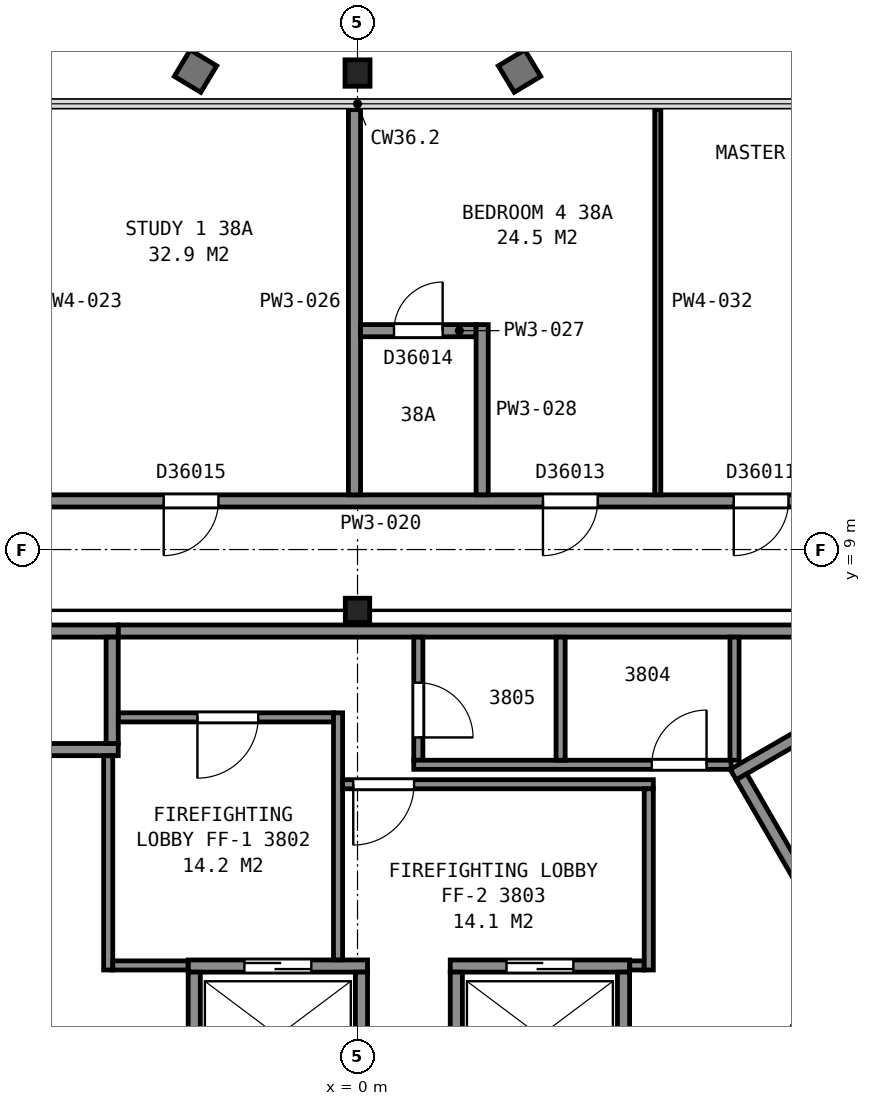
"""IFC4 building model, lengths in metres.
Left out: names, types, materials, properties, quantities, classifications, styles, units other than length and angle.
Written with IfcOpenShell. Run it as: python <this file> out.ifc"""

import sys

from ifc_helpers import new_model, si_unit, direction, frame, frame_2d, origin, origin_2d, place, context, subcontext, project, spatial, rectangle, i_section, extrude, element, fill, save


model = new_model("IFC4")
c1 = context("Model", 3, precision=1e-05, world=origin(), true_north=direction((0.0, 1.0)))
c2 = subcontext(c1, "Body", "Model", "MODEL_VIEW")
j1 = project(units=[si_unit("LENGTHUNIT", "METRE"), si_unit("PLANEANGLEUNIT", "RADIAN")], contexts=[c1])
p1 = place(None, origin())
s1 = spatial("IfcSite", under=j1, at=p1, CompositionType="ELEMENT")
p2 = place(p1, origin())
s2 = spatial("IfcBuilding", under=s1, at=p2, CompositionType="ELEMENT")
p3 = place(p2, frame((0.0, 0.0, 156.2)))
s3 = spatial("IfcBuildingStorey", under=s2, at=p3, CompositionType="ELEMENT", Elevation=156.2)
p4 = place(p3, frame((0.0, 16.617, 0.035), z_axis=(0.0, 0.185900290054, 0.982568614478), x_axis=(1.0, 0.0, 0.0)))
e1 = element("IfcColumn", 1, at=p4, inside=s3, PredefinedType="COLUMN", context=c2, shape_type="SweptSolid", body=[
    extrude(i_section(OverallWidth=0.411, OverallDepth=0.434, WebThickness=0.036, FlangeThickness=0.057, FilletRadius=0.015, at=origin_2d()), origin(), (0.0, 0.0, 1.0), 3.694),
])
p5 = place(p3, frame((0.0, 8.0, 0.0), z_axis=(0.0, 0.0, 1.0), x_axis=(1.0, 0.0, 0.0)))
e2 = element("IfcColumn", 2, at=p5, inside=s3, PredefinedType="COLUMN", context=c2, shape_type="SweptSolid", body=[
    extrude(i_section(OverallWidth=0.401, OverallDepth=0.399, WebThickness=0.025, FlangeThickness=0.04, FilletRadius=0.015, at=origin_2d()), origin(), (0.0, 0.0, 1.0), 3.7),
])
p6 = place(p3, frame((6.178, 5.299, 0.0), z_axis=(0.0, 0.0, 1.0), x_axis=(0.866019993635, 0.500009370536, 0.0)))
e3 = element("IfcWall", 3, at=p6, inside=s3, PredefinedType="PARTITIONING", context=c2, shape_type="SweptSolid", body=[
    extrude(rectangle(XDim=9.6, YDim=0.2, at=frame_2d((4.8, 0.0))), origin(), (0.0, 0.0, 1.0), 3.45),
])
p7 = place(p3, frame((7.715, 2.838, 0.0), z_axis=(0.0, 0.0, 1.0), x_axis=(-0.500049511043, 0.865996816683, 0.0)))
e4 = element("IfcWall", 4, at=p7, inside=s3, PredefinedType="PARTITIONING", context=c2, shape_type="SweptSolid", body=[
    extrude(rectangle(XDim=2.8, YDim=0.2, at=frame_2d((1.4, 0.0))), origin(), (0.0, 0.0, 1.0), 3.45),
])
p8 = place(p3, frame((-2.785, 2.15, 0.0), z_axis=(0.0, 0.0, 1.0), x_axis=(1.0, 0.0, 0.0)))
e5 = element("IfcWall", 5, at=p8, inside=s3, PredefinedType="PARTITIONING", context=c2, shape_type="SweptSolid", body=[
    extrude(rectangle(XDim=2.95, YDim=0.2, at=frame_2d((1.475, 0.0))), origin(), (0.0, 0.0, 1.0), 3.7),
])
p9 = place(p8, frame((0.925, 0.0, 0.0)))
e6 = element("IfcOpeningElement", 6, at=p9, cuts=e5, PredefinedType="OPENING", context=c2, shape_type="SweptSolid", body=[
    extrude(rectangle(XDim=1.1, YDim=2.1, at=frame_2d((0.55, 1.05))), frame((0.0, 0.11, 0.0), z_axis=(0.0, -1.0, 0.0), x_axis=(1.0, 0.0, 0.0)), (0.0, 0.0, 1.0), 0.22),
])
p10 = place(p3, frame((1.525, 2.15, 0.0), z_axis=(0.0, 0.0, 1.0), x_axis=(1.0, 0.0, 0.0)))
e7 = element("IfcWall", 7, at=p10, inside=s3, PredefinedType="PARTITIONING", context=c2, shape_type="SweptSolid", body=[
    extrude(rectangle(XDim=2.95, YDim=0.2, at=frame_2d((1.475, 0.0))), origin(), (0.0, 0.0, 1.0), 3.7),
])
p11 = place(p10, frame((0.925, 0.0, 0.0)))
e8 = element("IfcOpeningElement", 8, at=p11, cuts=e7, PredefinedType="OPENING", context=c2, shape_type="SweptSolid", body=[
    extrude(rectangle(XDim=1.1, YDim=2.1, at=frame_2d((0.55, 1.05))), frame((0.0, 0.11, 0.0), z_axis=(0.0, -1.0, 0.0), x_axis=(1.0, 0.0, 0.0)), (0.0, 0.0, 1.0), 0.22),
])
for number, where, z_axis, x_axis in (
    (9, (-6.285, 5.71, 0.0), (0.0, 0.0, 1.0), (1.0, 0.0, 0.0)),
    (10, (-6.285, 7.66, 0.0), (0.0, 0.0, 1.0), (1.0, 0.0, 0.0)),
):
    element("IfcWall", number, at=place(p3, frame(where, z_axis=z_axis, x_axis=x_axis)), inside=s3, PredefinedType="PARTITIONING", context=c2, shape_type="SweptSolid", body=[
        extrude(rectangle(XDim=2.35, YDim=0.2, at=frame_2d((1.175, 0.0))), origin(), (0.0, 0.0, 1.0), 3.7),
    ])
p12 = place(p3, frame((5.663, -1.612, 0.0), z_axis=(0.0, 0.0, 1.0), x_axis=(0.49998122708, 0.866036242063, 0.0)))
e11 = element("IfcWall", 11, at=p12, inside=s3, PredefinedType="PARTITIONING", context=c2, shape_type="SweptSolid", body=[
    extrude(rectangle(XDim=4.9, YDim=0.2, at=frame_2d((2.45, 0.0))), origin(), (0.0, 0.0, 1.0), 3.7),
])
for number, where, z_axis, x_axis in (
    (12, (4.375, 0.1, 0.0), (0.0, 0.0, 1.0), (0.0, 1.0, 0.0)),
    (13, (1.625, 0.1, 0.0), (0.0, 0.0, 1.0), (0.0, 1.0, 0.0)),
    (14, (0.065, 0.1, 0.0), (0.0, 0.0, 1.0), (0.0, 1.0, 0.0)),
    (15, (-2.685, 0.1, 0.0), (0.0, 0.0, 1.0), (0.0, 1.0, 0.0)),
):
    element("IfcWall", number, at=place(p3, frame(where, z_axis=z_axis, x_axis=x_axis)), inside=s3, PredefinedType="PARTITIONING", context=c2, shape_type="SweptSolid", body=[
        extrude(rectangle(XDim=1.95, YDim=0.2, at=frame_2d((0.975, 0.0))), origin(), (0.0, 0.0, 1.0), 3.7),
    ])
p13 = place(p3, frame((-4.035, 5.81, 0.0), z_axis=(0.0, 0.0, 1.0), x_axis=(0.0, 1.0, 0.0)))
e16 = element("IfcWall", 16, at=p13, inside=s3, PredefinedType="PARTITIONING", context=c2, shape_type="SweptSolid", body=[
    extrude(rectangle(XDim=1.75, YDim=0.2, at=frame_2d((0.875, 0.0))), origin(), (0.0, 0.0, 1.0), 3.7),
])
p14 = place(p3, frame((-4.1, 2.085, 0.0), z_axis=(0.0, 0.0, 1.0), x_axis=(0.0, 1.0, 0.0)))
e17 = element("IfcWall", 17, at=p14, inside=s3, PredefinedType="PARTITIONING", context=c2, shape_type="SweptSolid", body=[
    extrude(rectangle(XDim=3.523, YDim=0.15, at=frame_2d((1.761, 0.0))), origin(), (0.0, 0.0, 1.0), 3.45),
])
p15 = place(p3, frame((-4.025, 2.16, 0.0), z_axis=(0.0, 0.0, 1.0), x_axis=(1.0, 0.0, 0.0)))
e18 = element("IfcWall", 18, at=p15, inside=s3, PredefinedType="PARTITIONING", context=c2, shape_type="SweptSolid", body=[
    extrude(rectangle(XDim=1.238, YDim=0.15, at=frame_2d((0.619, 0.0))), origin(), (0.0, 0.0, 1.0), 3.45),
])
p16 = place(p3, frame((-3.933, 6.24, 0.0), z_axis=(0.0, 0.0, 1.0), x_axis=(1.0, 0.0, 0.0)))
e19 = element("IfcWall", 19, at=p16, inside=s3, PredefinedType="PARTITIONING", context=c2, shape_type="SweptSolid", body=[
    extrude(rectangle(XDim=3.538, YDim=0.15, at=frame_2d((1.769, 0.0))), origin(), (0.0, 0.0, 1.0), 3.45),
])
p17 = place(p16, frame((1.3, 0.0, 0.0)))
e20 = element("IfcOpeningElement", 20, at=p17, cuts=e19, PredefinedType="OPENING", context=c2, shape_type="SweptSolid", body=[
    extrude(rectangle(XDim=1.0, YDim=2.1, at=frame_2d((0.5, 1.05))), frame((0.0, 0.085, 0.0), z_axis=(0.0, -1.0, 0.0), x_axis=(1.0, 0.0, 0.0)), (0.0, 0.0, 1.0), 0.17),
])
p18 = place(p3, frame((-3.933, 7.66, 0.0), z_axis=(0.0, 0.0, 1.0), x_axis=(1.0, 0.0, 0.0)))
e21 = element("IfcWall", 21, at=p18, inside=s3, PredefinedType="PARTITIONING", context=c2, shape_type="SweptSolid", body=[
    extrude(rectangle(XDim=13.841, YDim=0.2, at=frame_2d((6.92, 0.0))), origin(), (0.0, 0.0, 1.0), 3.45),
])
p19 = place(p3, frame((-0.32, 2.252, 0.0), z_axis=(0.0, 0.0, 1.0), x_axis=(0.0, 1.0, 0.0)))
e22 = element("IfcWall", 22, at=p19, inside=s3, PredefinedType="PARTITIONING", context=c2, shape_type="SweptSolid", body=[
    extrude(rectangle(XDim=4.063, YDim=0.15, at=frame_2d((2.031, 0.0))), origin(), (0.0, 0.0, 1.0), 3.45),
])
p20 = place(p3, frame((-0.245, 5.14, 0.0), z_axis=(0.0, 0.0, 1.0), x_axis=(1.0, 0.0, 0.0)))
e23 = element("IfcWall", 23, at=p20, inside=s3, PredefinedType="PARTITIONING", context=c2, shape_type="SweptSolid", body=[
    extrude(rectangle(XDim=5.11, YDim=0.15, at=frame_2d((2.555, 0.0))), origin(), (0.0, 0.0, 1.0), 3.45),
])
p21 = place(p20, frame((0.175, 0.0, 0.0)))
e24 = element("IfcOpeningElement", 24, at=p21, cuts=e23, PredefinedType="OPENING", context=c2, shape_type="SweptSolid", body=[
    extrude(rectangle(XDim=1.0, YDim=2.1, at=frame_2d((0.5, 1.05))), frame((0.0, 0.085, 0.0), z_axis=(0.0, -1.0, 0.0), x_axis=(1.0, 0.0, 0.0)), (0.0, 0.0, 1.0), 0.17),
])
p22 = place(p3, frame((1.0, 7.56, 0.0), z_axis=(0.0, 0.0, 1.0), x_axis=(0.0, -1.0, 0.0)))
e25 = element("IfcWall", 25, at=p22, inside=s3, PredefinedType="PARTITIONING", context=c2, shape_type="SweptSolid", body=[
    extrude(rectangle(XDim=2.025, YDim=0.15, at=frame_2d((1.013, 0.0))), origin(), (0.0, 0.0, 1.0), 3.45),
])
p23 = place(p22, frame((0.75, 0.0, 0.0)))
e26 = element("IfcOpeningElement", 26, at=p23, cuts=e25, PredefinedType="OPENING", context=c2, shape_type="SweptSolid", body=[
    extrude(rectangle(XDim=0.9, YDim=2.1, at=frame_2d((0.45, 1.05))), frame((0.0, 0.085, 0.0), z_axis=(0.0, -1.0, 0.0), x_axis=(1.0, 0.0, 0.0)), (0.0, 0.0, 1.0), 0.17),
])
p24 = place(p3, frame((0.925, 5.46, 0.0), z_axis=(0.0, 0.0, 1.0), x_axis=(1.0, 0.0, 0.0)))
e27 = element("IfcWall", 27, at=p24, inside=s3, PredefinedType="PARTITIONING", context=c2, shape_type="SweptSolid", body=[
    extrude(rectangle(XDim=5.22, YDim=0.15, at=frame_2d((2.61, 0.0))), origin(), (0.0, 0.0, 1.0), 3.45),
])
p25 = place(p24, frame((3.915, 0.0, 0.0)))
e28 = element("IfcOpeningElement", 28, at=p25, cuts=e27, PredefinedType="OPENING", context=c2, shape_type="SweptSolid", body=[
    extrude(rectangle(XDim=0.9, YDim=2.1, at=frame_2d((0.45, 1.05))), frame((0.0, 0.085, 0.0), z_axis=(0.0, -1.0, 0.0), x_axis=(1.0, 0.0, 0.0)), (0.0, 0.0, 1.0), 0.17),
])
p26 = place(p3, frame((3.34, 5.535, 0.0), z_axis=(0.0, 0.0, 1.0), x_axis=(0.0, 1.0, 0.0)))
e29 = element("IfcWall", 29, at=p26, inside=s3, PredefinedType="PARTITIONING", context=c2, shape_type="SweptSolid", body=[
    extrude(rectangle(XDim=2.025, YDim=0.15, at=frame_2d((1.013, 0.0))), origin(), (0.0, 0.0, 1.0), 3.45),
])
p27 = place(p3, frame((4.477, 2.16, 0.0), z_axis=(0.0, 0.0, 1.0), x_axis=(1.0, 0.0, 0.0)))
e30 = element("IfcWall", 30, at=p27, inside=s3, PredefinedType="PARTITIONING", context=c2, shape_type="SweptSolid", body=[
    extrude(rectangle(XDim=0.238, YDim=0.15, at=frame_2d((0.119, 0.0))), origin(), (0.0, 0.0, 1.0), 3.45),
])
p28 = place(p3, frame((4.79, 2.085, 0.0), z_axis=(0.0, 0.0, 1.0), x_axis=(0.0, 1.0, 0.0)))
e31 = element("IfcWall", 31, at=p28, inside=s3, PredefinedType="PARTITIONING", context=c2, shape_type="SweptSolid", body=[
    extrude(rectangle(XDim=2.98, YDim=0.15, at=frame_2d((1.49, 0.0))), origin(), (0.0, 0.0, 1.0), 3.45),
])
p29 = place(p3, frame((6.2, 5.535, 0.0), z_axis=(0.0, 0.0, 1.0), x_axis=(0.0, 1.0, 0.0)))
e32 = element("IfcWall", 32, at=p29, inside=s3, PredefinedType="PARTITIONING", context=c2, shape_type="SweptSolid", body=[
    extrude(rectangle(XDim=2.025, YDim=0.15, at=frame_2d((1.013, 0.0))), origin(), (0.0, 0.0, 1.0), 3.45),
])
p30 = place(p3, frame((-4.075, -12.545, 0.0), z_axis=(0.0, 0.0, 1.0), x_axis=(-0.499999743747, 0.866025551732, 0.0)))
e33 = element("IfcWall", 33, at=p30, inside=s3, PredefinedType="PARTITIONING", context=c2, shape_type="SweptSolid", body=[
    extrude(rectangle(XDim=17.656, YDim=0.2, at=frame_2d((8.828, 0.0))), origin(), (0.0, 0.0, 1.0), 2.713),
])
p31 = place(p30, frame((10.08, 0.0, 0.0)))
e34 = element("IfcOpeningElement", 34, at=p31, cuts=e33, PredefinedType="OPENING", context=c2, shape_type="SweptSolid", body=[
    extrude(rectangle(XDim=0.9, YDim=2.1, at=frame_2d((0.45, 1.05))), frame((0.0, 0.11, 0.0), z_axis=(0.0, -1.0, 0.0), x_axis=(1.0, 0.0, 0.0)), (0.0, 0.0, 1.0), 0.22),
])
p32 = place(p30, frame((6.068, 0.0, 0.0)))
e35 = element("IfcOpeningElement", 35, at=p32, cuts=e33, PredefinedType="OPENING", context=c2, shape_type="SweptSolid", body=[
    extrude(rectangle(XDim=0.9, YDim=2.1, at=frame_2d((0.45, 1.05))), frame((0.0, 0.11, 0.0), z_axis=(0.0, -1.0, 0.0), x_axis=(1.0, 0.0, 0.0)), (0.0, 0.0, 1.0), 0.22),
])
p33 = place(p3, frame((-8.878, 9.8, 0.0), z_axis=(0.0, 0.0, 1.0), x_axis=(1.0, 0.0, 0.0)))
e36 = element("IfcWall", 36, at=p33, inside=s3, PredefinedType="PARTITIONING", context=c2, shape_type="SweptSolid", body=[
    extrude(rectangle(XDim=17.756, YDim=0.2, at=frame_2d((8.878, 0.0))), origin(), (0.0, 0.0, 1.0), 2.713),
])
p34 = place(p33, frame((15.066, 0.0, 0.0)))
e37 = element("IfcOpeningElement", 37, at=p34, cuts=e36, PredefinedType="OPENING", context=c2, shape_type="SweptSolid", body=[
    extrude(rectangle(XDim=0.9, YDim=2.1, at=frame_2d((0.45, 1.05))), frame((0.0, 0.11, 0.0), z_axis=(0.0, -1.0, 0.0), x_axis=(1.0, 0.0, 0.0)), (0.0, 0.0, 1.0), 0.22),
])
p35 = place(p33, frame((11.928, 0.0, 0.0)))
e38 = element("IfcOpeningElement", 38, at=p35, cuts=e36, PredefinedType="OPENING", context=c2, shape_type="SweptSolid", body=[
    extrude(rectangle(XDim=0.9, YDim=2.1, at=frame_2d((0.45, 1.05))), frame((0.0, 0.11, 0.0), z_axis=(0.0, -1.0, 0.0), x_axis=(1.0, 0.0, 0.0)), (0.0, 0.0, 1.0), 0.22),
])
p36 = place(p33, frame((5.691, 0.0, 0.0)))
e39 = element("IfcOpeningElement", 39, at=p36, cuts=e36, PredefinedType="OPENING", context=c2, shape_type="SweptSolid", body=[
    extrude(rectangle(XDim=0.9, YDim=2.1, at=frame_2d((0.45, 1.05))), frame((0.0, 0.11, 0.0), z_axis=(0.0, -1.0, 0.0), x_axis=(1.0, 0.0, 0.0)), (0.0, 0.0, 1.0), 0.22),
])
p37 = place(p33, frame((1.553, 0.0, 0.0)))
e40 = element("IfcOpeningElement", 40, at=p37, cuts=e36, PredefinedType="OPENING", context=c2, shape_type="SweptSolid", body=[
    extrude(rectangle(XDim=0.9, YDim=2.1, at=frame_2d((0.45, 1.05))), frame((0.0, 0.11, 0.0), z_axis=(0.0, -1.0, 0.0), x_axis=(1.0, 0.0, 0.0)), (0.0, 0.0, 1.0), 0.22),
])
p38 = place(p3, frame((-0.05, 9.9, 0.0), z_axis=(0.0, 0.0, 1.0), x_axis=(0.0, 1.0, 0.0)))
e41 = element("IfcWall", 41, at=p38, inside=s3, PredefinedType="PARTITIONING", context=c2, shape_type="SweptSolid", body=[
    extrude(rectangle(XDim=6.335, YDim=0.2, at=frame_2d((3.167, 0.0))), origin(), (0.0, 0.0, 1.0), 2.713),
])
p39 = place(p3, frame((1.95, 12.6, 0.0), z_axis=(0.0, 0.0, 1.0), x_axis=(-1.0, 0.0, 0.0)))
e42 = element("IfcWall", 42, at=p39, inside=s3, PredefinedType="PARTITIONING", context=c2, shape_type="SweptSolid", body=[
    extrude(rectangle(XDim=1.9, YDim=0.2, at=frame_2d((0.95, 0.0))), origin(), (0.0, 0.0, 1.0), 2.713),
])
p40 = place(p39, frame((0.55, 0.0, 0.0)))
e43 = element("IfcOpeningElement", 43, at=p40, cuts=e42, PredefinedType="OPENING", context=c2, shape_type="SweptSolid", body=[
    extrude(rectangle(XDim=0.8, YDim=2.1, at=frame_2d((0.4, 1.05))), frame((0.0, 0.11, 0.0), z_axis=(0.0, -1.0, 0.0), x_axis=(1.0, 0.0, 0.0)), (0.0, 0.0, 1.0), 0.22),
])
p41 = place(p3, frame((2.05, 9.9, 0.0), z_axis=(0.0, 0.0, 1.0), x_axis=(0.0, 1.0, 0.0)))
e44 = element("IfcWall", 44, at=p41, inside=s3, PredefinedType="PARTITIONING", context=c2, shape_type="SweptSolid", body=[
    extrude(rectangle(XDim=2.8, YDim=0.2, at=frame_2d((1.4, 0.0))), origin(), (0.0, 0.0, 1.0), 2.713),
])
p42 = place(p3, frame((12.928, 2.789, 0.0), z_axis=(0.0, 0.0, 1.0), x_axis=(-0.499997769292, -0.86602669168, 0.0)))
e45 = element("IfcWall", 45, at=p42, inside=s3, PredefinedType="PARTITIONING", context=c2, shape_type="SweptSolid", body=[
    extrude(rectangle(XDim=17.706, YDim=0.2, at=frame_2d((8.853, 0.0))), origin(), (0.0, 0.0, 1.0), 2.713),
])
p43 = place(p42, frame((15.156, 0.0, 0.0)))
e46 = element("IfcOpeningElement", 46, at=p43, cuts=e45, PredefinedType="OPENING", context=c2, shape_type="SweptSolid", body=[
    extrude(rectangle(XDim=1.2, YDim=2.1, at=frame_2d((0.6, 1.05))), frame((0.0, 0.11, 0.0), z_axis=(0.0, -1.0, 0.0), x_axis=(1.0, 0.0, 0.0)), (0.0, 0.0, 1.0), 0.22),
])
p44 = place(p42, frame((11.042, 0.0, 0.0)))
e47 = element("IfcOpeningElement", 47, at=p44, cuts=e45, PredefinedType="OPENING", context=c2, shape_type="SweptSolid", body=[
    extrude(rectangle(XDim=0.9, YDim=2.1, at=frame_2d((0.45, 1.05))), frame((0.0, 0.11, 0.0), z_axis=(0.0, -1.0, 0.0), x_axis=(1.0, 0.0, 0.0)), (0.0, 0.0, 1.0), 0.22),
])
p45 = place(p42, frame((7.14, 0.0, 0.0)))
e48 = element("IfcOpeningElement", 48, at=p45, cuts=e45, PredefinedType="OPENING", context=c2, shape_type="SweptSolid", body=[
    extrude(rectangle(XDim=0.9, YDim=2.1, at=frame_2d((0.45, 1.05))), frame((0.0, 0.11, 0.0), z_axis=(0.0, -1.0, 0.0), x_axis=(1.0, 0.0, 0.0)), (0.0, 0.0, 1.0), 0.22),
])
p46 = place(p42, frame((0.515, 0.0, 0.0)))
e49 = element("IfcOpeningElement", 49, at=p46, cuts=e45, PredefinedType="OPENING", context=c2, shape_type="SweptSolid", body=[
    extrude(rectangle(XDim=0.9, YDim=2.1, at=frame_2d((0.45, 1.05))), frame((0.0, 0.11, 0.0), z_axis=(0.0, -1.0, 0.0), x_axis=(1.0, 0.0, 0.0)), (0.0, 0.0, 1.0), 0.22),
])
p47 = place(p3, frame((4.938, 9.9, 0.0), z_axis=(0.0, 0.0, 1.0), x_axis=(0.0, 1.0, 0.0)))
e50 = element("IfcWall", 50, at=p47, inside=s3, PredefinedType="PARTITIONING", context=c2, shape_type="SweptSolid", body=[
    extrude(rectangle(XDim=6.335, YDim=0.1, at=frame_2d((3.167, 0.0))), origin(), (0.0, 0.0, 1.0), 2.713),
])
p48 = place(p9, origin())
e51 = element("IfcDoor", 51, at=p48, inside=s3, OperationType="SLIDING_TO_LEFT", PredefinedType="DOOR", context=c2, shape_type="SweptSolid", body=[
    extrude(rectangle(XDim=1.1, YDim=2.1, at=frame_2d((0.55, 1.05))), frame((0.0, 0.025, 0.0), z_axis=(0.0, -1.0, 0.0), x_axis=(1.0, 0.0, 0.0)), (0.0, 0.0, 1.0), 0.05),
])
fill(e6, e51)
p49 = place(p11, origin())
e52 = element("IfcDoor", 52, at=p49, inside=s3, OperationType="SLIDING_TO_RIGHT", PredefinedType="DOOR", context=c2, shape_type="SweptSolid", body=[
    extrude(rectangle(XDim=1.1, YDim=2.1, at=frame_2d((0.55, 1.05))), frame((0.0, 0.025, 0.0), z_axis=(0.0, -1.0, 0.0), x_axis=(1.0, 0.0, 0.0)), (0.0, 0.0, 1.0), 0.05),
])
fill(e8, e52)
p50 = place(p17, origin())
e53 = element("IfcDoor", 53, at=p50, inside=s3, OperationType="SINGLE_SWING_LEFT", PredefinedType="DOOR", context=c2, shape_type="SweptSolid", body=[
    extrude(rectangle(XDim=1.0, YDim=2.1, at=frame_2d((0.5, 1.05))), frame((0.0, 0.025, 0.0), z_axis=(0.0, -1.0, 0.0), x_axis=(1.0, 0.0, 0.0)), (0.0, 0.0, 1.0), 0.05),
])
fill(e20, e53)
p51 = place(p21, origin())
e54 = element("IfcDoor", 54, at=p51, inside=s3, OperationType="SINGLE_SWING_LEFT", PredefinedType="DOOR", context=c2, shape_type="SweptSolid", body=[
    extrude(rectangle(XDim=1.0, YDim=2.1, at=frame_2d((0.5, 1.05))), frame((0.0, 0.025, 0.0), z_axis=(0.0, -1.0, 0.0), x_axis=(1.0, 0.0, 0.0)), (0.0, 0.0, 1.0), 0.05),
])
fill(e24, e54)
p52 = place(p23, origin())
e55 = element("IfcDoor", 55, at=p52, inside=s3, OperationType="SINGLE_SWING_RIGHT", PredefinedType="DOOR", context=c2, shape_type="SweptSolid", body=[
    extrude(rectangle(XDim=0.9, YDim=2.1, at=frame_2d((0.45, 1.05))), frame((0.0, 0.025, 0.0), z_axis=(0.0, -1.0, 0.0), x_axis=(1.0, 0.0, 0.0)), (0.0, 0.0, 1.0), 0.05),
])
fill(e26, e55)
p53 = place(p25, origin())
e56 = element("IfcDoor", 56, at=p53, inside=s3, OperationType="SINGLE_SWING_RIGHT", PredefinedType="DOOR", context=c2, shape_type="SweptSolid", body=[
    extrude(rectangle(XDim=0.9, YDim=2.1, at=frame_2d((0.45, 1.05))), frame((0.0, 0.025, 0.0), z_axis=(0.0, -1.0, 0.0), x_axis=(1.0, 0.0, 0.0)), (0.0, 0.0, 1.0), 0.05),
])
fill(e28, e56)
p54 = place(p34, origin())
e57 = element("IfcDoor", 57, at=p54, inside=s3, OperationType="SINGLE_SWING_LEFT", PredefinedType="DOOR", context=c2, shape_type="SweptSolid", body=[
    extrude(rectangle(XDim=0.9, YDim=2.1, at=frame_2d((0.45, 1.05))), frame((0.0, 0.025, 0.0), z_axis=(0.0, -1.0, 0.0), x_axis=(1.0, 0.0, 0.0)), (0.0, 0.0, 1.0), 0.05),
])
fill(e37, e57)
p55 = place(p35, origin())
e58 = element("IfcDoor", 58, at=p55, inside=s3, OperationType="SINGLE_SWING_LEFT", PredefinedType="DOOR", context=c2, shape_type="SweptSolid", body=[
    extrude(rectangle(XDim=0.9, YDim=2.1, at=frame_2d((0.45, 1.05))), frame((0.0, 0.025, 0.0), z_axis=(0.0, -1.0, 0.0), x_axis=(1.0, 0.0, 0.0)), (0.0, 0.0, 1.0), 0.05),
])
fill(e38, e58)
p56 = place(p36, origin())
e59 = element("IfcDoor", 59, at=p56, inside=s3, OperationType="SINGLE_SWING_LEFT", PredefinedType="DOOR", context=c2, shape_type="SweptSolid", body=[
    extrude(rectangle(XDim=0.9, YDim=2.1, at=frame_2d((0.45, 1.05))), frame((0.0, 0.025, 0.0), z_axis=(0.0, -1.0, 0.0), x_axis=(1.0, 0.0, 0.0)), (0.0, 0.0, 1.0), 0.05),
])
fill(e39, e59)
p57 = place(p40, origin())
e60 = element("IfcDoor", 60, at=p57, inside=s3, OperationType="SINGLE_SWING_LEFT", PredefinedType="DOOR", context=c2, shape_type="SweptSolid", body=[
    extrude(rectangle(XDim=0.8, YDim=2.1, at=frame_2d((0.4, 1.05))), frame((0.0, 0.025, 0.0), z_axis=(0.0, -1.0, 0.0), x_axis=(1.0, 0.0, 0.0)), (0.0, 0.0, 1.0), 0.05),
])
fill(e43, e60)
save(model, sys.argv[1])
